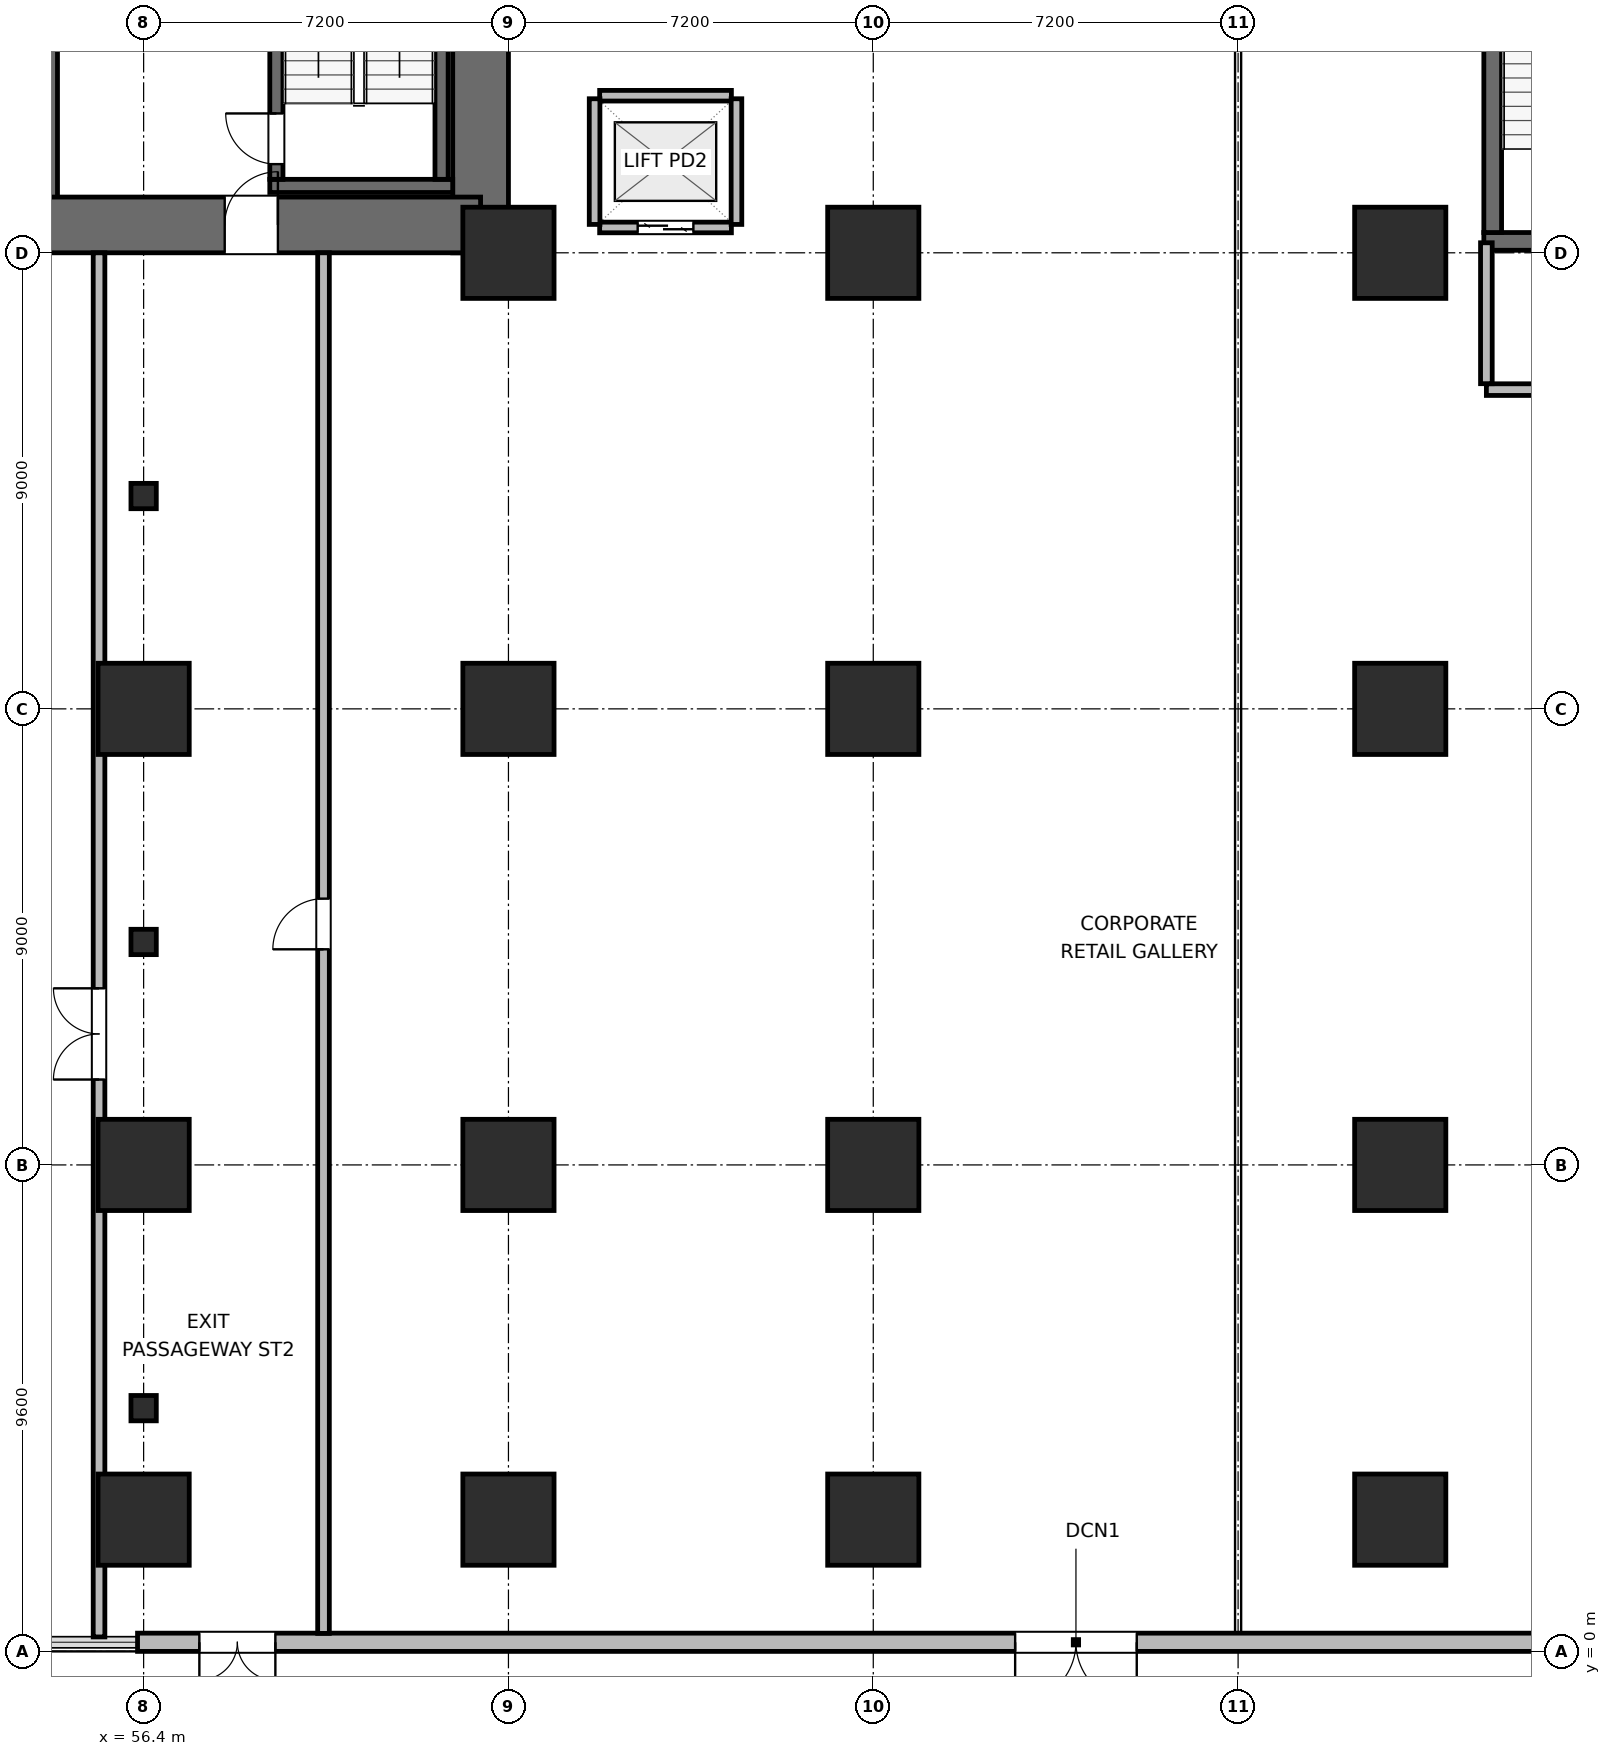
"""IFC4 building model, lengths in metres.
Left out: names, types, materials, properties, quantities, classifications, styles, units other than length and angle.
Written with IfcOpenShell. Run it as: python <this file> out.ifc"""

import sys

from ifc_helpers import new_model, si_unit, direction, frame, frame_2d, origin, origin_2d, place, context, subcontext, project, spatial, rectangle, hollow_rectangle, extrude, element, fill, save


model = new_model("IFC4")
c1 = context("Model", 3, precision=1e-05, world=origin(), true_north=direction((0.0, 1.0)))
c2 = subcontext(c1, "Body", "Model", "MODEL_VIEW")
j1 = project(units=[si_unit("LENGTHUNIT", "METRE"), si_unit("PLANEANGLEUNIT", "RADIAN")], contexts=[c1])
p1 = place(None, origin())
s1 = spatial("IfcSite", under=j1, at=p1, CompositionType="ELEMENT")
p2 = place(p1, origin())
s2 = spatial("IfcBuilding", under=s1, at=p2, CompositionType="ELEMENT")
p3 = place(p2, origin())
s3 = spatial("IfcBuildingStorey", under=s2, at=p3, CompositionType="ELEMENT", Elevation=0.0)
p4 = place(p3, frame((54.15, 28.15, 0.0), z_axis=(0.0, 0.0, 1.0), x_axis=(0.0, 1.0, 0.0)))
e1 = element("IfcWall", 1, at=p4, inside=s3, PredefinedType="SHEAR", context=c2, shape_type="SweptSolid", body=[
    extrude(rectangle(XDim=7.65, YDim=1.1, at=frame_2d((3.825, 0.0))), origin(), (0.0, 0.0, 1.0), 4.5),
])
p5 = place(p3, frame((63.05, 27.6, 0.0), z_axis=(0.0, 0.0, 1.0), x_axis=(0.0, 1.0, 0.0)))
e2 = element("IfcWall", 2, at=p5, inside=s3, PredefinedType="SHEAR", context=c2, shape_type="SweptSolid", body=[
    extrude(rectangle(XDim=16.8, YDim=1.1, at=frame_2d((8.4, 0.0))), origin(), (0.0, 0.0, 1.0), 4.5),
])
p6 = place(p3, frame((54.15, 28.15, 0.0), z_axis=(0.0, 0.0, 1.0), x_axis=(1.0, 0.0, 0.0)))
e3 = element("IfcWall", 3, at=p6, inside=s3, PredefinedType="SHEAR", context=c2, shape_type="SweptSolid", body=[
    extrude(rectangle(XDim=8.9, YDim=1.1, at=frame_2d((4.45, 0.0))), origin(), (0.0, 0.0, 1.0), 4.5),
])
p7 = place(p6, frame((3.85, 0.0, 0.0)))
e4 = element("IfcOpeningElement", 4, at=p7, cuts=e3, PredefinedType="OPENING", context=c2, shape_type="SweptSolid", body=[
    extrude(rectangle(XDim=1.05, YDim=2.04, at=frame_2d((0.525, 1.02))), frame((0.0, 0.56, 0.0), z_axis=(0.0, -1.0, 0.0), x_axis=(1.0, 0.0, 0.0)), (0.0, 0.0, 1.0), 1.12),
])
p8 = place(p3, frame((58.89, 28.92, 0.0), z_axis=(0.0, 0.0, 1.0), x_axis=(1.0, 0.0, 0.0)))
e5 = element("IfcWall", 5, at=p8, inside=s3, PredefinedType="SHEAR", context=c2, shape_type="SweptSolid", body=[
    extrude(rectangle(XDim=3.61, YDim=0.26, at=frame_2d((1.805, 0.0))), origin(), (0.0, 0.0, 1.0), 4.5),
])
p9 = place(p3, frame((59.02, 29.05, 0.0), z_axis=(0.0, 0.0, 1.0), x_axis=(0.0, 1.0, 0.0)))
e6 = element("IfcWall", 6, at=p9, inside=s3, PredefinedType="SHEAR", context=c2, shape_type="SweptSolid", body=[
    extrude(rectangle(XDim=7.6, YDim=0.26, at=frame_2d((3.8, 0.0))), origin(), (0.0, 0.0, 1.0), 4.5),
])
p10 = place(p9, frame((0.3, 0.0, 0.0)))
e7 = element("IfcOpeningElement", 7, at=p10, cuts=e6, PredefinedType="OPENING", context=c2, shape_type="SweptSolid", body=[
    extrude(rectangle(XDim=1.0, YDim=2.04, at=frame_2d((0.5, 1.02))), frame((0.0, 0.14, 0.0), z_axis=(0.0, -1.0, 0.0), x_axis=(1.0, 0.0, 0.0)), (0.0, 0.0, 1.0), 0.28),
])
p11 = place(p3, frame((62.28, 29.05, 0.0), z_axis=(0.0, 0.0, 1.0), x_axis=(0.0, 1.0, 0.0)))
e8 = element("IfcWall", 8, at=p11, inside=s3, PredefinedType="SHEAR", context=c2, shape_type="SweptSolid", body=[
    extrude(rectangle(XDim=7.6, YDim=0.26, at=frame_2d((3.8, 0.0))), origin(), (0.0, 0.0, 1.0), 4.5),
])
p12 = place(p3, frame((82.85, 27.825, 0.0), z_axis=(0.0, 0.0, 1.0), x_axis=(1.0, 0.0, 0.0)))
e9 = element("IfcWall", 9, at=p12, inside=s3, PredefinedType="SHEAR", context=c2, shape_type="SweptSolid", body=[
    extrude(rectangle(XDim=3.9, YDim=0.35, at=frame_2d((1.95, 0.0))), origin(), (0.0, 0.0, 1.0), 4.5),
])
p13 = place(p12, frame((1.4, 0.0, 0.0)))
e10 = element("IfcOpeningElement", 10, at=p13, cuts=e9, PredefinedType="OPENING", context=c2, shape_type="SweptSolid", body=[
    extrude(rectangle(XDim=1.1, YDim=2.05, at=frame_2d((0.55, 1.025))), frame((0.0, 0.185, 0.0), z_axis=(0.0, -1.0, 0.0), x_axis=(1.0, 0.0, 0.0)), (0.0, 0.0, 1.0), 0.37),
])
p14 = place(p3, frame((83.025, 28.0, 0.0), z_axis=(0.0, 0.0, 1.0), x_axis=(0.0, 1.0, 0.0)))
e11 = element("IfcWall", 11, at=p14, inside=s3, PredefinedType="SHEAR", context=c2, shape_type="SweptSolid", body=[
    extrude(rectangle(XDim=8.4, YDim=0.35, at=frame_2d((4.2, 0.0))), origin(), (0.0, 0.0, 1.0), 4.5),
])
for number, where, z_axis, x_axis in (
    (12, (56.4, 2.6, 0.0), (0.0, 0.0, 1.0), (1.0, 0.0, 0.0)),
    (13, (56.4, 9.6, 0.0), (0.0, 0.0, 1.0), (1.0, 0.0, 0.0)),
    (14, (56.4, 18.6, 0.0), (0.0, 0.0, 1.0), (1.0, 0.0, 0.0)),
    (15, (63.6, 2.6, 0.0), (0.0, 0.0, 1.0), (1.0, 0.0, 0.0)),
    (16, (63.6, 9.6, 0.0), (0.0, 0.0, 1.0), (1.0, 0.0, 0.0)),
    (17, (63.6, 18.6, 0.0), (0.0, 0.0, 1.0), (1.0, 0.0, 0.0)),
    (18, (63.6, 27.6, 0.0), (0.0, 0.0, 1.0), (1.0, 0.0, 0.0)),
    (19, (70.8, 2.6, 0.0), (0.0, 0.0, 1.0), (1.0, 0.0, 0.0)),
    (20, (70.8, 9.6, 0.0), (0.0, 0.0, 1.0), (1.0, 0.0, 0.0)),
    (21, (70.8, 18.6, 0.0), (0.0, 0.0, 1.0), (1.0, 0.0, 0.0)),
    (22, (70.8, 27.6, 0.0), (0.0, 0.0, 1.0), (1.0, 0.0, 0.0)),
    (23, (81.2, 2.6, 0.0), (0.0, 0.0, 1.0), (1.0, 0.0, 0.0)),
    (24, (81.2, 9.6, 0.0), (0.0, 0.0, 1.0), (1.0, 0.0, 0.0)),
    (25, (81.2, 18.6, 0.0), (0.0, 0.0, 1.0), (1.0, 0.0, 0.0)),
    (26, (81.2, 27.6, 0.0), (0.0, 0.0, 1.0), (1.0, 0.0, 0.0)),
):
    element("IfcColumn", number, at=place(p3, frame(where, z_axis=z_axis, x_axis=x_axis)), inside=s3, PredefinedType="COLUMN", context=c2, shape_type="SweptSolid", body=[
        extrude(rectangle(XDim=1.8, YDim=1.8, at=origin_2d()), origin(), (0.0, 0.0, 1.0), 4.5),
    ])
for number, where, z_axis, x_axis in (
    (27, (56.4, 4.8, 0.0), (0.0, 0.0, 1.0), (1.0, 0.0, 0.0)),
    (28, (56.4, 14.0, 0.0), (0.0, 0.0, 1.0), (1.0, 0.0, 0.0)),
    (29, (56.4, 22.8, 0.0), (0.0, 0.0, 1.0), (1.0, 0.0, 0.0)),
):
    element("IfcColumn", number, at=place(p3, frame(where, z_axis=z_axis, x_axis=x_axis)), inside=s3, PredefinedType="PILASTER", context=c2, shape_type="SweptSolid", body=[
        extrude(hollow_rectangle(XDim=0.5, YDim=0.5, WallThickness=0.025, at=origin_2d()), origin(), (0.0, 0.0, 1.0), 4.18),
    ])
p15 = place(p3, frame((96.0, 0.18, 0.0), z_axis=(0.0, 0.0, 1.0), x_axis=(-1.0, 0.0, 0.0)))
e30 = element("IfcWall", 30, at=p15, inside=s3, PredefinedType="SOLIDWALL", context=c2, shape_type="SweptSolid", body=[
    extrude(rectangle(XDim=39.72, YDim=0.36, at=frame_2d((19.86, 0.0))), origin(), (0.0, 0.0, 1.0), 4.18),
])
p16 = place(p15, frame((37.0, 0.0, 0.0)))
e31 = element("IfcOpeningElement", 31, at=p16, cuts=e30, PredefinedType="OPENING", context=c2, shape_type="SweptSolid", body=[
    extrude(rectangle(XDim=1.5, YDim=2.15, at=frame_2d((0.75, 1.075))), frame((0.0, 0.19, 0.0), z_axis=(0.0, -1.0, 0.0), x_axis=(1.0, 0.0, 0.0)), (0.0, 0.0, 1.0), 0.38),
])
p17 = place(p15, frame((20.0, 0.0, 0.0)))
e32 = element("IfcOpeningElement", 32, at=p17, cuts=e30, PredefinedType="OPENING", context=c2, shape_type="SweptSolid", body=[
    extrude(rectangle(XDim=2.4, YDim=2.4, at=frame_2d((1.2, 1.2))), frame((0.0, 0.19, 0.0), z_axis=(0.0, -1.0, 0.0), x_axis=(1.0, 0.0, 0.0)), (0.0, 0.0, 1.0), 0.38),
])
p18 = place(p3, frame((65.4, 28.1, 0.0), z_axis=(0.0, 0.0, 1.0), x_axis=(1.0, 0.0, 0.0)))
e33 = element("IfcWall", 33, at=p18, inside=s3, PredefinedType="PARTITIONING", context=c2, shape_type="SweptSolid", body=[
    extrude(rectangle(XDim=2.6, YDim=0.21, at=frame_2d((1.3, 0.0))), origin(), (0.0, 0.0, 1.0), 4.18),
])
p19 = place(p18, frame((0.75, 0.0, 0.0)))
e34 = element("IfcOpeningElement", 34, at=p19, cuts=e33, PredefinedType="OPENING", context=c2, shape_type="SweptSolid", body=[
    extrude(rectangle(XDim=1.1, YDim=2.04, at=frame_2d((0.55, 1.02))), frame((0.0, 0.115, 0.0), z_axis=(0.0, -1.0, 0.0), x_axis=(1.0, 0.0, 0.0)), (0.0, 0.0, 1.0), 0.23),
])
p20 = place(p3, frame((65.4, 30.7, 0.0), z_axis=(0.0, 0.0, 1.0), x_axis=(1.0, 0.0, 0.0)))
e35 = element("IfcWall", 35, at=p20, inside=s3, PredefinedType="PARTITIONING", context=c2, shape_type="SweptSolid", body=[
    extrude(rectangle(XDim=2.6, YDim=0.21, at=frame_2d((1.3, 0.0))), origin(), (0.0, 0.0, 1.0), 4.18),
])
for number, where, z_axis, x_axis in (
    (36, (65.3, 28.16, 0.0), (0.0, 0.0, 1.0), (0.0, 1.0, 0.0)),
    (37, (68.1, 28.16, 0.0), (0.0, 0.0, 1.0), (0.0, 1.0, 0.0)),
):
    element("IfcWall", number, at=place(p3, frame(where, z_axis=z_axis, x_axis=x_axis)), inside=s3, PredefinedType="PARTITIONING", context=c2, shape_type="SweptSolid", body=[
        extrude(rectangle(XDim=2.48, YDim=0.21, at=frame_2d((1.24, 0.0))), origin(), (0.0, 0.0, 1.0), 4.18),
    ])
p21 = place(p3, frame((55.52, 0.285, 0.0), z_axis=(0.0, 0.0, 1.0), x_axis=(0.0, 1.0, 0.0)))
e38 = element("IfcWall", 38, at=p21, inside=s3, PredefinedType="PARTITIONING", context=c2, shape_type="SweptSolid", body=[
    extrude(rectangle(XDim=27.315, YDim=0.23, at=frame_2d((13.658, 0.0))), origin(), (0.0, 0.0, 1.0), 4.18),
])
p22 = place(p21, frame((11.0, 0.0, 0.0)))
e39 = element("IfcOpeningElement", 39, at=p22, cuts=e38, PredefinedType="OPENING", context=c2, shape_type="SweptSolid", body=[
    extrude(rectangle(XDim=1.8, YDim=2.06, at=frame_2d((0.9, 1.03))), frame((0.0, 0.125, 0.0), z_axis=(0.0, -1.0, 0.0), x_axis=(1.0, 0.0, 0.0)), (0.0, 0.0, 1.0), 0.25),
])
p23 = place(p3, frame((59.95, 0.355, 0.0), z_axis=(0.0, 0.0, 1.0), x_axis=(0.0, 1.0, 0.0)))
e40 = element("IfcWall", 40, at=p23, inside=s3, PredefinedType="PARTITIONING", context=c2, shape_type="SweptSolid", body=[
    extrude(rectangle(XDim=27.245, YDim=0.23, at=frame_2d((13.623, 0.0))), origin(), (0.0, 0.0, 1.0), 4.18),
])
p24 = place(p23, frame((13.5, 0.0, 0.0)))
e41 = element("IfcOpeningElement", 41, at=p24, cuts=e40, PredefinedType="OPENING", context=c2, shape_type="SweptSolid", body=[
    extrude(rectangle(XDim=1.0, YDim=2.04, at=frame_2d((0.5, 1.02))), frame((0.0, 0.125, 0.0), z_axis=(0.0, -1.0, 0.0), x_axis=(1.0, 0.0, 0.0)), (0.0, 0.0, 1.0), 0.25),
])
p25 = place(p3, frame((82.9, 24.9, 0.0), z_axis=(0.0, 0.0, 1.0), x_axis=(1.0, 0.0, 0.0)))
e42 = element("IfcWall", 42, at=p25, inside=s3, PredefinedType="PARTITIONING", context=c2, shape_type="SweptSolid", body=[
    extrude(rectangle(XDim=12.735, YDim=0.23, at=frame_2d((6.368, 0.0))), origin(), (0.0, 0.0, 1.0), 4.18),
])
p26 = place(p3, frame((82.9, 25.017, 0.0), z_axis=(0.0, 0.0, 1.0), x_axis=(0.0, 1.0, 0.0)))
e43 = element("IfcWall", 43, at=p26, inside=s3, PredefinedType="PARTITIONING", context=c2, shape_type="SweptSolid", body=[
    extrude(rectangle(XDim=2.781, YDim=0.23, at=frame_2d((1.391, 0.0))), origin(), (0.0, 0.0, 1.0), 4.18),
])
p27 = place(p16, origin())
e44 = element("IfcDoor", 44, at=p27, inside=s3, OperationType="DOUBLE_DOOR_SINGLE_SWING", PredefinedType="DOOR", context=c2, shape_type="SweptSolid", body=[
    extrude(rectangle(XDim=1.5, YDim=2.15, at=frame_2d((0.75, 1.075))), frame((0.0, 0.025, 0.0), z_axis=(0.0, -1.0, 0.0), x_axis=(1.0, 0.0, 0.0)), (0.0, 0.0, 1.0), 0.05),
])
fill(e31, e44)
p28 = place(p17, origin())
e45 = element("IfcDoor", 45, at=p28, inside=s3, OperationType="DOUBLE_DOOR_SINGLE_SWING", PredefinedType="DOOR", context=c2, shape_type="SweptSolid", body=[
    extrude(rectangle(XDim=2.4, YDim=2.4, at=frame_2d((1.2, 1.2))), frame((0.0, 0.025, 0.0), z_axis=(0.0, -1.0, 0.0), x_axis=(1.0, 0.0, 0.0)), (0.0, 0.0, 1.0), 0.05),
])
fill(e32, e45)
p29 = place(p10, origin())
e46 = element("IfcDoor", 46, at=p29, inside=s3, OperationType="SINGLE_SWING_RIGHT", PredefinedType="DOOR", context=c2, shape_type="SweptSolid", body=[
    extrude(rectangle(XDim=1.0, YDim=2.04, at=frame_2d((0.5, 1.02))), frame((0.0, 0.025, 0.0), z_axis=(0.0, -1.0, 0.0), x_axis=(1.0, 0.0, 0.0)), (0.0, 0.0, 1.0), 0.05),
])
fill(e7, e46)
p30 = place(p19, origin())
e47 = element("IfcDoor", 47, at=p30, inside=s3, OperationType="DOUBLE_DOOR_SLIDING", PredefinedType="DOOR", context=c2, shape_type="SweptSolid", body=[
    extrude(rectangle(XDim=1.1, YDim=2.04, at=frame_2d((0.55, 1.02))), frame((0.0, 0.025, 0.0), z_axis=(0.0, -1.0, 0.0), x_axis=(1.0, 0.0, 0.0)), (0.0, 0.0, 1.0), 0.05),
])
fill(e34, e47)
p31 = place(p7, origin())
e48 = element("IfcDoor", 48, at=p31, inside=s3, OperationType="SINGLE_SWING_RIGHT", PredefinedType="DOOR", context=c2, shape_type="SweptSolid", body=[
    extrude(rectangle(XDim=1.05, YDim=2.04, at=frame_2d((0.525, 1.02))), frame((0.0, 0.025, 0.0), z_axis=(0.0, -1.0, 0.0), x_axis=(1.0, 0.0, 0.0)), (0.0, 0.0, 1.0), 0.05),
])
fill(e4, e48)
p32 = place(p22, origin())
e49 = element("IfcDoor", 49, at=p32, inside=s3, OperationType="DOUBLE_DOOR_SINGLE_SWING", PredefinedType="DOOR", context=c2, shape_type="SweptSolid", body=[
    extrude(rectangle(XDim=1.8, YDim=2.06, at=frame_2d((0.9, 1.03))), frame((0.0, 0.025, 0.0), z_axis=(0.0, -1.0, 0.0), x_axis=(1.0, 0.0, 0.0)), (0.0, 0.0, 1.0), 0.05),
])
fill(e39, e49)
p33 = place(p24, origin())
e50 = element("IfcDoor", 50, at=p33, inside=s3, OperationType="SINGLE_SWING_LEFT", PredefinedType="DOOR", context=c2, shape_type="SweptSolid", body=[
    extrude(rectangle(XDim=1.0, YDim=2.04, at=frame_2d((0.5, 1.02))), frame((0.0, 0.025, 0.0), z_axis=(0.0, -1.0, 0.0), x_axis=(1.0, 0.0, 0.0)), (0.0, 0.0, 1.0), 0.05),
])
fill(e41, e50)
save(model, sys.argv[1])
